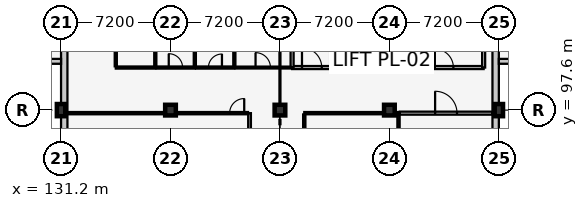
"""IFC4 building model, lengths in metres.
Left out: names, types, materials, properties, quantities, classifications, styles, units other than length and angle.
Written with IfcOpenShell. Run it as: python <this file> out.ifc"""

import sys

from ifc_helpers import new_model, si_unit, direction, frame, frame_2d, origin, origin_2d, place, context, subcontext, project, spatial, rectangle, extrude, element, fill, save


model = new_model("IFC4")
c1 = context("Model", 3, precision=1e-05, world=origin(), true_north=direction((0.0, 1.0)))
c2 = subcontext(c1, "Body", "Model", "MODEL_VIEW")
j1 = project(units=[si_unit("LENGTHUNIT", "METRE"), si_unit("PLANEANGLEUNIT", "RADIAN")], contexts=[c1])
p1 = place(None, origin())
s1 = spatial("IfcSite", under=j1, at=p1, CompositionType="ELEMENT")
p2 = place(p1, origin())
s2 = spatial("IfcBuilding", under=s1, at=p2, CompositionType="ELEMENT")
p3 = place(p2, frame((0.0, 0.0, 18.0)))
s3 = spatial("IfcBuildingStorey", under=s2, at=p3, CompositionType="ELEMENT", Elevation=18.0)
p4 = place(p3, frame((131.2, 97.6, 0.0), z_axis=(0.0, 0.0, 1.0), x_axis=(1.0, 0.0, 0.0)))
e1 = element("IfcColumn", 1, at=p4, inside=s3, PredefinedType="COLUMN", context=c2, shape_type="SweptSolid", body=[
    extrude(rectangle(XDim=0.55, YDim=0.8, at=origin_2d()), origin(), (0.0, 0.0, 1.0), 3.9),
])
for number, where, z_axis, x_axis in (
    (2, (138.4, 97.6, 0.0), (0.0, 0.0, 1.0), (1.0, 0.0, 0.0)),
    (3, (145.6, 97.6, 0.0), (0.0, 0.0, 1.0), (1.0, 0.0, 0.0)),
    (4, (152.8, 97.6, 0.0), (0.0, 0.0, 1.0), (1.0, 0.0, 0.0)),
):
    element("IfcColumn", number, at=place(p3, frame(where, z_axis=z_axis, x_axis=x_axis)), inside=s3, PredefinedType="COLUMN", context=c2, shape_type="SweptSolid", body=[
        extrude(rectangle(XDim=0.7, YDim=0.7, at=origin_2d()), origin(), (0.0, 0.0, 1.0), 3.9),
    ])
p5 = place(p3, frame((160.0, 97.6, 0.0), z_axis=(0.0, 0.0, 1.0), x_axis=(1.0, 0.0, 0.0)))
e5 = element("IfcColumn", 5, at=p5, inside=s3, PredefinedType="COLUMN", context=c2, shape_type="SweptSolid", body=[
    extrude(rectangle(XDim=0.55, YDim=0.8, at=origin_2d()), origin(), (0.0, 0.0, 1.0), 3.9),
])
p6 = place(p3, frame((159.79, 112.0, 0.0), z_axis=(0.0, 0.0, 1.0), x_axis=(0.0, -1.0, 0.0)))
e6 = element("IfcWall", 6, at=p6, inside=s3, PredefinedType="SOLIDWALL", context=c2, shape_type="SweptSolid", body=[
    extrude(rectangle(XDim=28.8, YDim=0.42, at=frame_2d((14.4, 0.0))), origin(), (0.0, 0.0, 1.0), 3.055),
])
p7 = place(p3, frame((160.0, 100.81, 0.0), z_axis=(0.0, 0.0, 1.0), x_axis=(1.0, 0.0, 0.0)))
e7 = element("IfcWall", 7, at=p7, inside=s3, PredefinedType="SOLIDWALL", context=c2, shape_type="SweptSolid", body=[
    extrude(rectangle(XDim=1.793, YDim=0.32, at=frame_2d((0.896, 0.0))), origin(), (0.0, 0.0, 1.0), 3.64),
])
p8 = place(p3, frame((131.41, 83.2, 0.0), z_axis=(0.0, 0.0, 1.0), x_axis=(0.0, 1.0, 0.0)))
e8 = element("IfcWall", 8, at=p8, inside=s3, PredefinedType="SOLIDWALL", context=c2, shape_type="SweptSolid", body=[
    extrude(rectangle(XDim=28.8, YDim=0.42, at=frame_2d((14.4, 0.0))), origin(), (0.0, 0.0, 1.0), 3.055),
])
p9 = place(p3, frame((131.2, 100.81, 0.0), z_axis=(0.0, 0.0, 1.0), x_axis=(-1.0, 0.0, 0.0)))
e9 = element("IfcWall", 9, at=p9, inside=s3, PredefinedType="SOLIDWALL", context=c2, shape_type="SweptSolid", body=[
    extrude(rectangle(XDim=1.35, YDim=0.32, at=frame_2d((0.675, 0.0))), origin(), (0.0, 0.0, 1.0), 3.64),
])
p10 = place(p3, frame((146.4, 100.4, 0.0), z_axis=(0.0, 0.0, 1.0), x_axis=(1.0, 0.0, 0.0)))
e10 = element("IfcWall", 10, at=p10, inside=s3, PredefinedType="PARTITIONING", context=c2, shape_type="SweptSolid", body=[
    extrude(rectangle(XDim=2.6, YDim=0.2, at=frame_2d((1.3, 0.0))), origin(), (0.0, 0.0, 1.0), 3.66),
])
p11 = place(p10, frame((0.65, 0.0, 0.0)))
e11 = element("IfcOpeningElement", 11, at=p11, cuts=e10, PredefinedType="OPENING", context=c2, shape_type="SweptSolid", body=[
    extrude(rectangle(XDim=1.3, YDim=2.2, at=frame_2d((0.65, 1.1))), frame((0.0, 0.112, 0.0), z_axis=(0.0, -1.0, 0.0), x_axis=(1.0, 0.0, 0.0)), (0.0, 0.0, 1.0), 0.224),
])
p12 = place(p3, frame((146.4, 106.2, 0.0), z_axis=(0.0, 0.0, 1.0), x_axis=(0.0, -1.0, 0.0)))
e12 = element("IfcWall", 12, at=p12, inside=s3, PredefinedType="PARTITIONING", context=c2, shape_type="SweptSolid", body=[
    extrude(rectangle(XDim=5.8, YDim=0.2, at=frame_2d((2.9, 0.0))), origin(), (0.0, 0.0, 1.0), 3.66),
])
p13 = place(p3, frame((149.0, 100.4, 0.0), z_axis=(0.0, 0.0, 1.0), x_axis=(0.0, 1.0, 0.0)))
e13 = element("IfcWall", 13, at=p13, inside=s3, PredefinedType="PARTITIONING", context=c2, shape_type="SweptSolid", body=[
    extrude(rectangle(XDim=5.8, YDim=0.2, at=frame_2d((2.9, 0.0))), origin(), (0.0, 0.0, 1.0), 3.325),
])
p14 = place(p3, frame((153.8, 100.4, 0.0), z_axis=(0.0, 0.0, 1.0), x_axis=(1.0, 0.0, 0.0)))
e14 = element("IfcWall", 14, at=p14, inside=s3, PredefinedType="PARTITIONING", context=c2, shape_type="SweptSolid", body=[
    extrude(rectangle(XDim=5.2, YDim=0.2, at=frame_2d((2.6, 0.0))), origin(), (0.0, 0.0, 1.0), 3.66),
])
p15 = place(p14, frame((1.99, 0.0, 0.0)))
e15 = element("IfcOpeningElement", 15, at=p15, cuts=e14, PredefinedType="OPENING", context=c2, shape_type="SweptSolid", body=[
    extrude(rectangle(XDim=1.22, YDim=2.2, at=frame_2d((0.61, 1.1))), frame((0.0, 0.112, 0.0), z_axis=(0.0, -1.0, 0.0), x_axis=(1.0, 0.0, 0.0)), (0.0, 0.0, 1.0), 0.224),
])
for number, where, z_axis, x_axis in (
    (16, (153.8, 106.2, 0.0), (0.0, 0.0, 1.0), (0.0, -1.0, 0.0)),
    (17, (159.0, 100.4, 0.0), (0.0, 0.0, 1.0), (0.0, 1.0, 0.0)),
):
    element("IfcWall", number, at=place(p3, frame(where, z_axis=z_axis, x_axis=x_axis)), inside=s3, PredefinedType="PARTITIONING", context=c2, shape_type="SweptSolid", body=[
        extrude(rectangle(XDim=5.8, YDim=0.2, at=frame_2d((2.9, 0.0))), origin(), (0.0, 0.0, 1.0), 3.66),
    ])
p16 = place(p3, frame((143.6, 83.63, 0.0), z_axis=(0.0, 0.0, 1.0), x_axis=(0.0, 1.0, 0.0)))
e18 = element("IfcWall", 18, at=p16, inside=s3, PredefinedType="PARTITIONING", context=c2, shape_type="SweptSolid", body=[
    extrude(rectangle(XDim=13.77, YDim=0.18, at=frame_2d((6.885, 0.0))), origin(), (0.0, 0.0, 1.0), 3.66),
])
p17 = place(p16, frame((2.925, 0.0, 0.0)))
e19 = element("IfcOpeningElement", 19, at=p17, cuts=e18, PredefinedType="OPENING", context=c2, shape_type="SweptSolid", body=[
    extrude(rectangle(XDim=0.92, YDim=2.08, at=frame_2d((0.46, 1.04))), frame((0.0, 0.102, 0.0), z_axis=(0.0, -1.0, 0.0), x_axis=(1.0, 0.0, 0.0)), (0.0, 0.0, 1.0), 0.204),
])
p18 = place(p3, frame((134.8, 100.4, 0.0), z_axis=(0.0, 0.0, 1.0), x_axis=(1.0, 0.0, 0.0)))
e20 = element("IfcWall", 20, at=p18, inside=s3, PredefinedType="PARTITIONING", context=c2, shape_type="SweptSolid", body=[
    extrude(rectangle(XDim=2.6, YDim=0.14, at=frame_2d((1.3, 0.0))), origin(), (0.0, 0.0, 1.0), 3.66),
])
p19 = place(p3, frame((134.8, 100.48, 0.0), z_axis=(0.0, 0.0, 1.0), x_axis=(0.0, 1.0, 0.0)))
e21 = element("IfcWall", 21, at=p19, inside=s3, PredefinedType="PARTITIONING", context=c2, shape_type="SweptSolid", body=[
    extrude(rectangle(XDim=4.86, YDim=0.14, at=frame_2d((2.43, 0.0))), origin(), (0.0, 0.0, 1.0), 3.445),
])
p20 = place(p19, frame((1.93, 0.0, 0.0)))
e22 = element("IfcOpeningElement", 22, at=p20, cuts=e21, PredefinedType="OPENING", context=c2, shape_type="SweptSolid", body=[
    extrude(rectangle(XDim=1.0, YDim=2.1, at=frame_2d((0.5, 1.05))), frame((0.0, 0.082, 0.0), z_axis=(0.0, -1.0, 0.0), x_axis=(1.0, 0.0, 0.0)), (0.0, 0.0, 1.0), 0.164),
])
p21 = place(p3, frame((137.4, 100.48, 0.0), z_axis=(0.0, 0.0, 1.0), x_axis=(0.0, 1.0, 0.0)))
e23 = element("IfcWall", 23, at=p21, inside=s3, PredefinedType="PARTITIONING", context=c2, shape_type="SweptSolid", body=[
    extrude(rectangle(XDim=4.86, YDim=0.14, at=frame_2d((2.43, 0.0))), origin(), (0.0, 0.0, 1.0), 3.66),
])
p22 = place(p3, frame((137.48, 100.4, 0.0), z_axis=(0.0, 0.0, 1.0), x_axis=(1.0, 0.0, 0.0)))
e24 = element("IfcWall", 24, at=p22, inside=s3, PredefinedType="PARTITIONING", context=c2, shape_type="SweptSolid", body=[
    extrude(rectangle(XDim=2.52, YDim=0.14, at=frame_2d((1.26, 0.0))), origin(), (0.0, 0.0, 1.0), 3.66),
])
p23 = place(p22, frame((0.805, 0.0, 0.0)))
e25 = element("IfcOpeningElement", 25, at=p23, cuts=e24, PredefinedType="OPENING", context=c2, shape_type="SweptSolid", body=[
    extrude(rectangle(XDim=0.91, YDim=2.06, at=frame_2d((0.455, 1.03))), frame((0.0, 0.082, 0.0), z_axis=(0.0, -1.0, 0.0), x_axis=(1.0, 0.0, 0.0)), (0.0, 0.0, 1.0), 0.164),
])
p24 = place(p3, frame((140.0, 100.48, 0.0), z_axis=(0.0, 0.0, 1.0), x_axis=(0.0, 1.0, 0.0)))
e26 = element("IfcWall", 26, at=p24, inside=s3, PredefinedType="PARTITIONING", context=c2, shape_type="SweptSolid", body=[
    extrude(rectangle(XDim=4.86, YDim=0.14, at=frame_2d((2.43, 0.0))), origin(), (0.0, 0.0, 1.0), 3.66),
])
p25 = place(p3, frame((140.08, 100.4, 0.0), z_axis=(0.0, 0.0, 1.0), x_axis=(1.0, 0.0, 0.0)))
e27 = element("IfcWall", 27, at=p25, inside=s3, PredefinedType="PARTITIONING", context=c2, shape_type="SweptSolid", body=[
    extrude(rectangle(XDim=2.52, YDim=0.14, at=frame_2d((1.26, 0.0))), origin(), (0.0, 0.0, 1.0), 3.66),
])
p26 = place(p25, frame((0.815, 0.0, 0.0)))
e28 = element("IfcOpeningElement", 28, at=p26, cuts=e27, PredefinedType="OPENING", context=c2, shape_type="SweptSolid", body=[
    extrude(rectangle(XDim=0.89, YDim=2.05, at=frame_2d((0.445, 1.025))), frame((0.0, 0.082, 0.0), z_axis=(0.0, -1.0, 0.0), x_axis=(1.0, 0.0, 0.0)), (0.0, 0.0, 1.0), 0.164),
])
p27 = place(p3, frame((142.6, 100.48, 0.0), z_axis=(0.0, 0.0, 1.0), x_axis=(0.0, 1.0, 0.0)))
e29 = element("IfcWall", 29, at=p27, inside=s3, PredefinedType="PARTITIONING", context=c2, shape_type="SweptSolid", body=[
    extrude(rectangle(XDim=4.86, YDim=0.14, at=frame_2d((2.43, 0.0))), origin(), (0.0, 0.0, 1.0), 3.66),
])
p28 = place(p3, frame((142.68, 100.4, 0.0), z_axis=(0.0, 0.0, 1.0), x_axis=(1.0, 0.0, 0.0)))
e30 = element("IfcWall", 30, at=p28, inside=s3, PredefinedType="PARTITIONING", context=c2, shape_type="SweptSolid", body=[
    extrude(rectangle(XDim=3.61, YDim=0.125, at=frame_2d((1.805, 0.0))), origin(), (0.0, 0.0, 1.0), 3.66),
])
p29 = place(p28, frame((1.315, 0.0, 0.0)))
e31 = element("IfcOpeningElement", 31, at=p29, cuts=e30, PredefinedType="OPENING", context=c2, shape_type="SweptSolid", body=[
    extrude(rectangle(XDim=0.98, YDim=2.12, at=frame_2d((0.49, 1.06))), frame((0.0, 0.074, 0.0), z_axis=(0.0, -1.0, 0.0), x_axis=(1.0, 0.0, 0.0)), (0.0, 0.0, 1.0), 0.149),
])
p30 = place(p3, frame((131.63, 97.4, 0.0), z_axis=(0.0, 0.0, 1.0), x_axis=(1.0, 0.0, 0.0)))
e32 = element("IfcWall", 32, at=p30, inside=s3, PredefinedType="PARTITIONING", context=c2, shape_type="SweptSolid", body=[
    extrude(rectangle(XDim=11.87, YDim=0.15, at=frame_2d((5.935, 0.0))), origin(), (0.0, 0.0, 1.0), 2.835),
])
p31 = place(p30, frame((10.66, 0.0, 0.0)))
e33 = element("IfcOpeningElement", 33, at=p31, cuts=e32, PredefinedType="OPENING", context=c2, shape_type="SweptSolid", body=[
    extrude(rectangle(XDim=0.96, YDim=2.1, at=frame_2d((0.48, 1.05))), frame((0.0, 0.087, 0.0), z_axis=(0.0, -1.0, 0.0), x_axis=(1.0, 0.0, 0.0)), (0.0, 0.0, 1.0), 0.174),
])
p32 = place(p3, frame((147.2, 97.4, 0.0), z_axis=(0.0, 0.0, 1.0), x_axis=(1.0, 0.0, 0.0)))
e34 = element("IfcWall", 34, at=p32, inside=s3, PredefinedType="PARTITIONING", context=c2, shape_type="SweptSolid", body=[
    extrude(rectangle(XDim=6.2, YDim=0.15, at=frame_2d((3.1, 0.0))), origin(), (0.0, 0.0, 1.0), 2.985),
])
p33 = place(p3, frame((147.2, 90.485, 0.0), z_axis=(0.0, 0.0, 1.0), x_axis=(0.0, 1.0, 0.0)))
e35 = element("IfcWall", 35, at=p33, inside=s3, PredefinedType="PARTITIONING", context=c2, shape_type="SweptSolid", body=[
    extrude(rectangle(XDim=6.83, YDim=0.15, at=frame_2d((3.415, 0.0))), origin(), (0.0, 0.0, 1.0), 3.66),
])
p34 = place(p33, frame((2.945, 0.0, 0.0)))
e36 = element("IfcOpeningElement", 36, at=p34, cuts=e35, PredefinedType="OPENING", context=c2, shape_type="SweptSolid", body=[
    extrude(rectangle(XDim=0.94, YDim=2.1, at=frame_2d((0.47, 1.05))), frame((0.0, 0.087, 0.0), z_axis=(0.0, -1.0, 0.0), x_axis=(1.0, 0.0, 0.0)), (0.0, 0.0, 1.0), 0.174),
])
p35 = place(p3, frame((153.4, 90.485, 0.0), z_axis=(0.0, 0.0, 1.0), x_axis=(0.0, 1.0, 0.0)))
e37 = element("IfcWall", 37, at=p35, inside=s3, PredefinedType="PARTITIONING", context=c2, shape_type="SweptSolid", body=[
    extrude(rectangle(XDim=6.83, YDim=0.15, at=frame_2d((3.415, 0.0))), origin(), (0.0, 0.0, 1.0), 3.66),
])
p36 = place(p3, frame((153.485, 97.4, 0.0), z_axis=(0.0, 0.0, 1.0), x_axis=(1.0, 0.0, 0.0)))
e38 = element("IfcWall", 38, at=p36, inside=s3, PredefinedType="PARTITIONING", context=c2, shape_type="SweptSolid", body=[
    extrude(rectangle(XDim=6.085, YDim=0.2, at=frame_2d((3.042, 0.0))), origin(), (0.0, 0.0, 1.0), 2.985),
])
p37 = place(p36, frame((2.323, 0.0, 0.0)))
e39 = element("IfcOpeningElement", 39, at=p37, cuts=e38, PredefinedType="OPENING", context=c2, shape_type="SweptSolid", body=[
    extrude(rectangle(XDim=1.44, YDim=2.2, at=frame_2d((0.72, 1.1))), frame((0.0, 0.112, 0.0), z_axis=(0.0, -1.0, 0.0), x_axis=(1.0, 0.0, 0.0)), (0.0, 0.0, 1.0), 0.224),
])
p38 = place(p11, origin())
e40 = element("IfcDoor", 40, at=p38, inside=s3, OperationType="SINGLE_SWING_LEFT", PredefinedType="DOOR", context=c2, shape_type="SweptSolid", body=[
    extrude(rectangle(XDim=1.3, YDim=2.2, at=frame_2d((0.65, 1.1))), frame((0.0, 0.025, 0.0), z_axis=(0.0, -1.0, 0.0), x_axis=(1.0, 0.0, 0.0)), (0.0, 0.0, 1.0), 0.05),
])
fill(e11, e40)
p39 = place(p15, origin())
e41 = element("IfcDoor", 41, at=p39, inside=s3, OperationType="SINGLE_SWING_LEFT", PredefinedType="DOOR", context=c2, shape_type="SweptSolid", body=[
    extrude(rectangle(XDim=1.22, YDim=2.2, at=frame_2d((0.61, 1.1))), frame((0.0, 0.025, 0.0), z_axis=(0.0, -1.0, 0.0), x_axis=(1.0, 0.0, 0.0)), (0.0, 0.0, 1.0), 0.05),
])
fill(e15, e41)
p40 = place(p23, origin())
e42 = element("IfcDoor", 42, at=p40, inside=s3, OperationType="SINGLE_SWING_LEFT", PredefinedType="DOOR", context=c2, shape_type="SweptSolid", body=[
    extrude(rectangle(XDim=0.91, YDim=2.06, at=frame_2d((0.455, 1.03))), frame((0.0, 0.025, 0.0), z_axis=(0.0, -1.0, 0.0), x_axis=(1.0, 0.0, 0.0)), (0.0, 0.0, 1.0), 0.05),
])
fill(e25, e42)
p41 = place(p26, origin())
e43 = element("IfcDoor", 43, at=p41, inside=s3, OperationType="SINGLE_SWING_RIGHT", PredefinedType="DOOR", context=c2, shape_type="SweptSolid", body=[
    extrude(rectangle(XDim=0.89, YDim=2.05, at=frame_2d((0.445, 1.025))), frame((0.0, 0.025, 0.0), z_axis=(0.0, -1.0, 0.0), x_axis=(1.0, 0.0, 0.0)), (0.0, 0.0, 1.0), 0.05),
])
fill(e28, e43)
p42 = place(p29, origin())
e44 = element("IfcDoor", 44, at=p42, inside=s3, OperationType="SINGLE_SWING_LEFT", PredefinedType="DOOR", context=c2, shape_type="SweptSolid", body=[
    extrude(rectangle(XDim=0.98, YDim=2.12, at=frame_2d((0.49, 1.06))), frame((0.0, 0.025, 0.0), z_axis=(0.0, -1.0, 0.0), x_axis=(1.0, 0.0, 0.0)), (0.0, 0.0, 1.0), 0.05),
])
fill(e31, e44)
p43 = place(p31, origin())
e45 = element("IfcDoor", 45, at=p43, inside=s3, OperationType="SINGLE_SWING_RIGHT", PredefinedType="DOOR", context=c2, shape_type="SweptSolid", body=[
    extrude(rectangle(XDim=0.96, YDim=2.1, at=frame_2d((0.48, 1.05))), frame((0.0, 0.025, 0.0), z_axis=(0.0, -1.0, 0.0), x_axis=(1.0, 0.0, 0.0)), (0.0, 0.0, 1.0), 0.05),
])
fill(e33, e45)
p44 = place(p37, origin())
e46 = element("IfcDoor", 46, at=p44, inside=s3, OperationType="SINGLE_SWING_LEFT", PredefinedType="DOOR", context=c2, shape_type="SweptSolid", body=[
    extrude(rectangle(XDim=1.44, YDim=2.2, at=frame_2d((0.72, 1.1))), frame((0.0, 0.025, 0.0), z_axis=(0.0, -1.0, 0.0), x_axis=(1.0, 0.0, 0.0)), (0.0, 0.0, 1.0), 0.05),
])
fill(e39, e46)
save(model, sys.argv[1])
